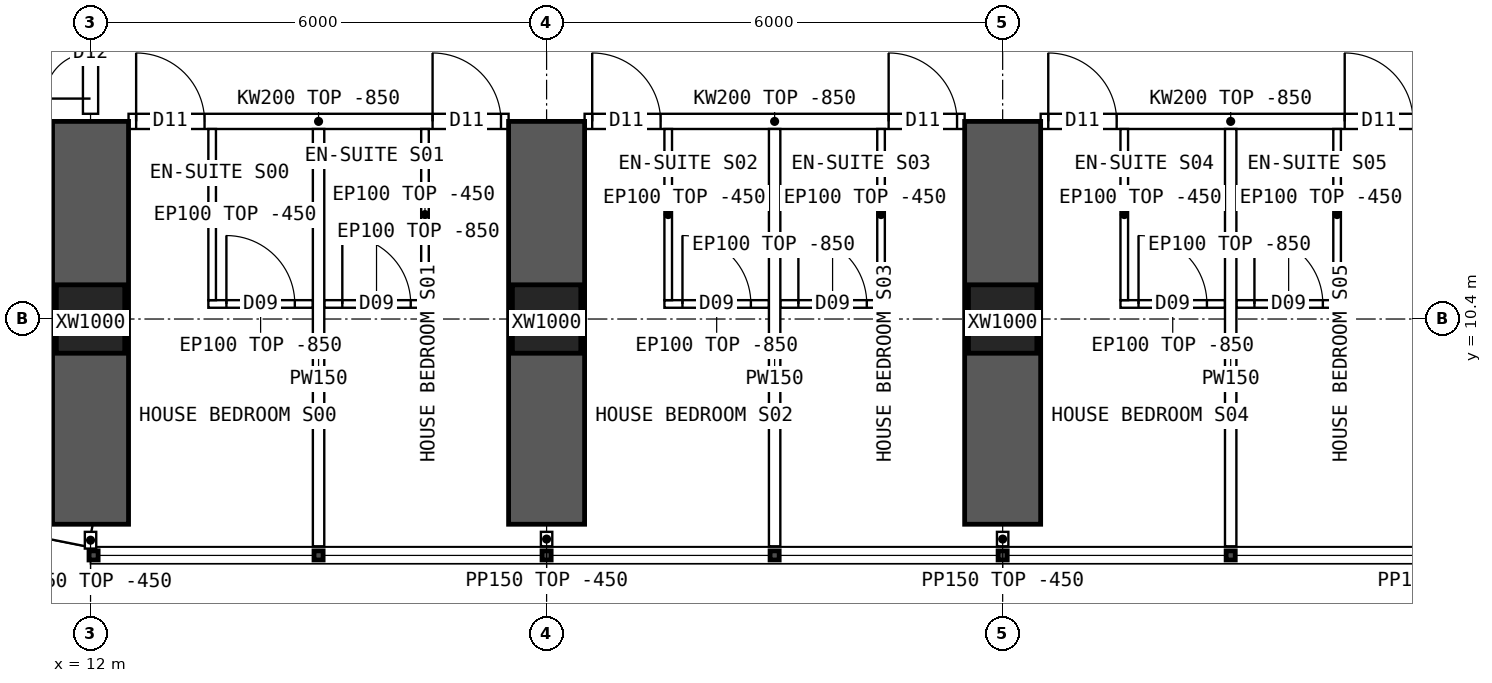
"""IFC4 building model, lengths in metres.
Left out: names, types, materials, properties, quantities, classifications, styles, units other than length and angle.
Written with IfcOpenShell. Run it as: python <this file> out.ifc"""

import sys

from ifc_helpers import new_model, si_unit, direction, frame, frame_2d, origin, origin_2d, place, context, subcontext, project, spatial, polyline, rectangle, hollow_rectangle, outline, extrude, element, fill, save


model = new_model("IFC4")
c1 = context("Model", 3, precision=1e-05, world=origin(), true_north=direction((0.0, 1.0)))
c2 = subcontext(c1, "Body", "Model", "MODEL_VIEW")
j1 = project(units=[si_unit("LENGTHUNIT", "METRE"), si_unit("PLANEANGLEUNIT", "RADIAN")], contexts=[c1])
p1 = place(None, origin())
s1 = spatial("IfcSite", under=j1, at=p1, CompositionType="ELEMENT")
p2 = place(p1, origin())
s2 = spatial("IfcBuilding", under=s1, at=p2, CompositionType="ELEMENT")
p3 = place(p2, frame((0.0, 0.0, 35.2)))
s3 = spatial("IfcBuildingStorey", under=s2, at=p3, CompositionType="ELEMENT", Elevation=35.2)
for number, where, z_axis, x_axis in (
    (1, (12.0, 10.4, 0.0), (0.0, 0.0, 1.0), (1.0, 0.0, 0.0)),
    (2, (18.0, 10.4, 0.0), (0.0, 0.0, 1.0), (1.0, 0.0, 0.0)),
    (3, (24.0, 10.4, 0.0), (0.0, 0.0, 1.0), (1.0, 0.0, 0.0)),
):
    element("IfcColumn", number, at=place(p3, frame(where, z_axis=z_axis, x_axis=x_axis)), inside=s3, PredefinedType="COLUMN", context=c2, shape_type="SweptSolid", body=[
        extrude(hollow_rectangle(XDim=0.9, YDim=0.9, WallThickness=0.09, at=origin_2d()), origin(), (0.0, 0.0, 1.0), 3.75),
    ])
for number, where, z_axis, x_axis in (
    (4, (12.0, 7.7, 0.0), (0.0, 0.0, 1.0), (0.0, 1.0, 0.0)),
    (5, (18.0, 7.7, 0.0), (0.0, 0.0, 1.0), (0.0, 1.0, 0.0)),
    (6, (24.0, 7.7, 0.0), (0.0, 0.0, 1.0), (0.0, 1.0, 0.0)),
):
    element("IfcWall", number, at=place(p3, frame(where, z_axis=z_axis, x_axis=x_axis)), inside=s3, PredefinedType="SHEAR", context=c2, shape_type="SweptSolid", body=[
        extrude(rectangle(XDim=5.3, YDim=1.0, at=frame_2d((2.65, 0.0))), origin(), (0.0, 0.0, 1.0), 3.75),
    ])
p4 = place(p3, frame((8.843, 8.178, 0.0), z_axis=(0.0, 0.0, 1.0), x_axis=(0.980787251524, -0.195080412259, 0.0)))
e7 = element("IfcWall", 7, at=p4, inside=s3, PredefinedType="SOLIDWALL", context=c2, shape_type="SweptSolid", body=[
    extrude(outline(polyline([(-0.03, -0.15), (3.249, -0.15), (3.189, 0.15), (0.03, 0.15), (-0.03, -0.15)])), origin(), (0.0, 0.0, 1.0), 3.3),
])
p5 = place(p4, frame((0.909, 0.0, 0.9)))
e8 = element("IfcOpeningElement", 8, at=p5, cuts=e7, PredefinedType="OPENING", context=c2, shape_type="SweptSolid", body=[
    extrude(rectangle(XDim=1.4, YDim=1.8, at=frame_2d((0.7, 0.9))), frame((0.0, 0.16, 0.0), z_axis=(0.0, -1.0, 0.0), x_axis=(1.0, 0.0, 0.0)), (0.0, 0.0, 1.0), 0.32),
])
p6 = place(p3, frame((12.5, 13.0, 0.0), z_axis=(0.0, 0.0, 1.0), x_axis=(1.0, 0.0, 0.0)))
e9 = element("IfcWall", 9, at=p6, inside=s3, PredefinedType="SOLIDWALL", context=c2, shape_type="SweptSolid", body=[
    extrude(outline(polyline([(0.0, 0.0), (5.0, 0.0), (5.0, 2.9), (0.0, 2.9), (0.0, 0.0)])), frame((0.0, 0.1, 0.0), z_axis=(0.0, -1.0, 0.0), x_axis=(1.0, 0.0, 0.0)), (0.0, 0.0, 1.0), 0.2),
])
p7 = place(p6, frame((0.1, 0.0, 0.0)))
e10 = element("IfcOpeningElement", 10, at=p7, cuts=e9, PredefinedType="OPENING", context=c2, shape_type="SweptSolid", body=[
    extrude(rectangle(XDim=0.9, YDim=2.1, at=frame_2d((0.45, 1.05))), frame((0.0, 0.11, 0.0), z_axis=(0.0, -1.0, 0.0), x_axis=(1.0, 0.0, 0.0)), (0.0, 0.0, 1.0), 0.22),
])
p8 = place(p6, frame((4.0, 0.0, 0.0)))
e11 = element("IfcOpeningElement", 11, at=p8, cuts=e9, PredefinedType="OPENING", context=c2, shape_type="SweptSolid", body=[
    extrude(rectangle(XDim=0.9, YDim=2.1, at=frame_2d((0.45, 1.05))), frame((0.0, 0.11, 0.0), z_axis=(0.0, -1.0, 0.0), x_axis=(1.0, 0.0, 0.0)), (0.0, 0.0, 1.0), 0.22),
])
p9 = place(p3, frame((18.5, 13.0, 0.0), z_axis=(0.0, 0.0, 1.0), x_axis=(1.0, 0.0, 0.0)))
e12 = element("IfcWall", 12, at=p9, inside=s3, PredefinedType="SOLIDWALL", context=c2, shape_type="SweptSolid", body=[
    extrude(outline(polyline([(0.0, 0.0), (5.0, 0.0), (5.0, 2.9), (0.0, 2.9), (0.0, 0.0)])), frame((0.0, 0.1, 0.0), z_axis=(0.0, -1.0, 0.0), x_axis=(1.0, 0.0, 0.0)), (0.0, 0.0, 1.0), 0.2),
])
p10 = place(p9, frame((0.1, 0.0, 0.0)))
e13 = element("IfcOpeningElement", 13, at=p10, cuts=e12, PredefinedType="OPENING", context=c2, shape_type="SweptSolid", body=[
    extrude(rectangle(XDim=0.9, YDim=2.1, at=frame_2d((0.45, 1.05))), frame((0.0, 0.11, 0.0), z_axis=(0.0, -1.0, 0.0), x_axis=(1.0, 0.0, 0.0)), (0.0, 0.0, 1.0), 0.22),
])
p11 = place(p9, frame((4.0, 0.0, 0.0)))
e14 = element("IfcOpeningElement", 14, at=p11, cuts=e12, PredefinedType="OPENING", context=c2, shape_type="SweptSolid", body=[
    extrude(rectangle(XDim=0.9, YDim=2.1, at=frame_2d((0.45, 1.05))), frame((0.0, 0.11, 0.0), z_axis=(0.0, -1.0, 0.0), x_axis=(1.0, 0.0, 0.0)), (0.0, 0.0, 1.0), 0.22),
])
p12 = place(p3, frame((24.5, 13.0, 0.0), z_axis=(0.0, 0.0, 1.0), x_axis=(1.0, 0.0, 0.0)))
e15 = element("IfcWall", 15, at=p12, inside=s3, PredefinedType="SOLIDWALL", context=c2, shape_type="SweptSolid", body=[
    extrude(outline(polyline([(0.0, 0.0), (5.0, 0.0), (5.0, 2.9), (0.0, 2.9), (0.0, 0.0)])), frame((0.0, 0.1, 0.0), z_axis=(0.0, -1.0, 0.0), x_axis=(1.0, 0.0, 0.0)), (0.0, 0.0, 1.0), 0.2),
])
p13 = place(p12, frame((0.1, 0.0, 0.0)))
e16 = element("IfcOpeningElement", 16, at=p13, cuts=e15, PredefinedType="OPENING", context=c2, shape_type="SweptSolid", body=[
    extrude(rectangle(XDim=0.9, YDim=2.1, at=frame_2d((0.45, 1.05))), frame((0.0, 0.11, 0.0), z_axis=(0.0, -1.0, 0.0), x_axis=(1.0, 0.0, 0.0)), (0.0, 0.0, 1.0), 0.22),
])
p14 = place(p12, frame((4.0, 0.0, 0.0)))
e17 = element("IfcOpeningElement", 17, at=p14, cuts=e15, PredefinedType="OPENING", context=c2, shape_type="SweptSolid", body=[
    extrude(rectangle(XDim=0.9, YDim=2.1, at=frame_2d((0.45, 1.05))), frame((0.0, 0.11, 0.0), z_axis=(0.0, -1.0, 0.0), x_axis=(1.0, 0.0, 0.0)), (0.0, 0.0, 1.0), 0.22),
])
p15 = place(p3, frame((15.0, 7.41, 0.0), z_axis=(0.0, 0.0, 1.0), x_axis=(0.0, 1.0, 0.0)))
e18 = element("IfcWall", 18, at=p15, inside=s3, PredefinedType="PARTITIONING", context=c2, shape_type="SweptSolid", body=[
    extrude(outline(polyline([(0.0, 0.0), (5.49, 0.0), (5.49, 2.9), (5.442, 2.9), (5.44, 3.3), (3.192, 3.3), (3.19, 2.9), (2.792, 2.9), (2.79, 3.3), (0.0, 3.3), (0.0, 0.0)])), frame((0.0, 0.075, 0.0), z_axis=(0.0, -1.0, 0.0), x_axis=(1.0, 0.0, 0.0)), (0.0, 0.0, 1.0), 0.15),
])
p16 = place(p3, frame((14.925, 10.598, 0.0), z_axis=(0.0, 0.0, 1.0), x_axis=(-1.0, 0.0, 0.0)))
e19 = element("IfcWall", 19, at=p16, inside=s3, PredefinedType="PARTITIONING", context=c2, shape_type="SweptSolid", body=[
    extrude(outline(polyline([(0.0, 0.0), (1.375, 0.0), (1.375, 2.9), (0.0, 2.9), (0.0, 0.0)])), frame((0.0, 0.05, 0.0), z_axis=(0.0, -1.0, 0.0), x_axis=(1.0, 0.0, 0.0)), (0.0, 0.0, 1.0), 0.1),
])
p17 = place(p16, frame((0.238, 0.0, 0.0)))
e20 = element("IfcOpeningElement", 20, at=p17, cuts=e19, PredefinedType="OPENING", context=c2, shape_type="SweptSolid", body=[
    extrude(rectangle(XDim=0.9, YDim=2.1, at=frame_2d((0.45, 1.05))), frame((0.0, 0.06, 0.0), z_axis=(0.0, -1.0, 0.0), x_axis=(1.0, 0.0, 0.0)), (0.0, 0.0, 1.0), 0.12),
])
p18 = place(p3, frame((13.6, 10.648, 0.0), z_axis=(0.0, 0.0, 1.0), x_axis=(0.0, 1.0, 0.0)))
e21 = element("IfcWall", 21, at=p18, inside=s3, PredefinedType="PARTITIONING", context=c2, shape_type="SweptSolid", body=[
    extrude(outline(polyline([(0.0, 0.0), (2.252, 0.0), (2.252, 2.9), (2.204, 2.9), (2.202, 3.3), (0.0, 3.3), (0.0, 0.0)])), frame((0.0, 0.05, 0.0), z_axis=(0.0, -1.0, 0.0), x_axis=(1.0, 0.0, 0.0)), (0.0, 0.0, 1.0), 0.1),
])
p19 = place(p3, frame((16.45, 10.598, 0.0), z_axis=(0.0, 0.0, 1.0), x_axis=(-1.0, 0.0, 0.0)))
e22 = element("IfcWall", 22, at=p19, inside=s3, PredefinedType="PARTITIONING", context=c2, shape_type="SweptSolid", body=[
    extrude(outline(polyline([(0.0, 0.0), (1.375, 0.0), (1.375, 2.9), (0.0, 2.9), (0.0, 0.0)])), frame((0.0, 0.05, 0.0), z_axis=(0.0, -1.0, 0.0), x_axis=(1.0, 0.0, 0.0)), (0.0, 0.0, 1.0), 0.1),
])
p20 = place(p19, frame((0.238, 0.0, 0.0)))
e23 = element("IfcOpeningElement", 23, at=p20, cuts=e22, PredefinedType="OPENING", context=c2, shape_type="SweptSolid", body=[
    extrude(rectangle(XDim=0.9, YDim=2.1, at=frame_2d((0.45, 1.05))), frame((0.0, 0.06, 0.0), z_axis=(0.0, -1.0, 0.0), x_axis=(1.0, 0.0, 0.0)), (0.0, 0.0, 1.0), 0.12),
])
p21 = place(p3, frame((16.4, 10.648, 0.0), z_axis=(0.0, 0.0, 1.0), x_axis=(0.0, 1.0, 0.0)))
e24 = element("IfcWall", 24, at=p21, inside=s3, PredefinedType="PARTITIONING", context=c2, shape_type="SweptSolid", body=[
    extrude(outline(polyline([(0.0, 0.0), (2.252, 0.0), (2.252, 2.9), (2.204, 2.9), (2.202, 3.3), (0.0, 3.3), (0.0, 0.0)])), frame((0.0, 0.05, 0.0), z_axis=(0.0, -1.0, 0.0), x_axis=(1.0, 0.0, 0.0)), (0.0, 0.0, 1.0), 0.1),
])
p22 = place(p3, frame((21.0, 7.41, 0.0), z_axis=(0.0, 0.0, 1.0), x_axis=(0.0, 1.0, 0.0)))
e25 = element("IfcWall", 25, at=p22, inside=s3, PredefinedType="PARTITIONING", context=c2, shape_type="SweptSolid", body=[
    extrude(outline(polyline([(0.0, 0.0), (5.49, 0.0), (5.49, 2.9), (5.442, 2.9), (5.44, 3.3), (3.192, 3.3), (3.19, 2.9), (2.792, 2.9), (2.79, 3.3), (0.0, 3.3), (0.0, 0.0)])), frame((0.0, 0.075, 0.0), z_axis=(0.0, -1.0, 0.0), x_axis=(1.0, 0.0, 0.0)), (0.0, 0.0, 1.0), 0.15),
])
p23 = place(p3, frame((20.925, 10.598, 0.0), z_axis=(0.0, 0.0, 1.0), x_axis=(-1.0, 0.0, 0.0)))
e26 = element("IfcWall", 26, at=p23, inside=s3, PredefinedType="PARTITIONING", context=c2, shape_type="SweptSolid", body=[
    extrude(outline(polyline([(0.0, 0.0), (1.375, 0.0), (1.375, 2.9), (0.0, 2.9), (0.0, 0.0)])), frame((0.0, 0.05, 0.0), z_axis=(0.0, -1.0, 0.0), x_axis=(1.0, 0.0, 0.0)), (0.0, 0.0, 1.0), 0.1),
])
p24 = place(p23, frame((0.238, 0.0, 0.0)))
e27 = element("IfcOpeningElement", 27, at=p24, cuts=e26, PredefinedType="OPENING", context=c2, shape_type="SweptSolid", body=[
    extrude(rectangle(XDim=0.9, YDim=2.1, at=frame_2d((0.45, 1.05))), frame((0.0, 0.06, 0.0), z_axis=(0.0, -1.0, 0.0), x_axis=(1.0, 0.0, 0.0)), (0.0, 0.0, 1.0), 0.12),
])
p25 = place(p3, frame((19.6, 10.648, 0.0), z_axis=(0.0, 0.0, 1.0), x_axis=(0.0, 1.0, 0.0)))
e28 = element("IfcWall", 28, at=p25, inside=s3, PredefinedType="PARTITIONING", context=c2, shape_type="SweptSolid", body=[
    extrude(outline(polyline([(0.0, 0.0), (2.252, 0.0), (2.252, 2.9), (2.204, 2.9), (2.202, 3.3), (0.0, 3.3), (0.0, 0.0)])), frame((0.0, 0.05, 0.0), z_axis=(0.0, -1.0, 0.0), x_axis=(1.0, 0.0, 0.0)), (0.0, 0.0, 1.0), 0.1),
])
p26 = place(p3, frame((22.45, 10.598, 0.0), z_axis=(0.0, 0.0, 1.0), x_axis=(-1.0, 0.0, 0.0)))
e29 = element("IfcWall", 29, at=p26, inside=s3, PredefinedType="PARTITIONING", context=c2, shape_type="SweptSolid", body=[
    extrude(outline(polyline([(0.0, 0.0), (1.375, 0.0), (1.375, 2.9), (0.0, 2.9), (0.0, 0.0)])), frame((0.0, 0.05, 0.0), z_axis=(0.0, -1.0, 0.0), x_axis=(1.0, 0.0, 0.0)), (0.0, 0.0, 1.0), 0.1),
])
p27 = place(p26, frame((0.238, 0.0, 0.0)))
e30 = element("IfcOpeningElement", 30, at=p27, cuts=e29, PredefinedType="OPENING", context=c2, shape_type="SweptSolid", body=[
    extrude(rectangle(XDim=0.9, YDim=2.1, at=frame_2d((0.45, 1.05))), frame((0.0, 0.06, 0.0), z_axis=(0.0, -1.0, 0.0), x_axis=(1.0, 0.0, 0.0)), (0.0, 0.0, 1.0), 0.12),
])
p28 = place(p3, frame((22.4, 10.648, 0.0), z_axis=(0.0, 0.0, 1.0), x_axis=(0.0, 1.0, 0.0)))
e31 = element("IfcWall", 31, at=p28, inside=s3, PredefinedType="PARTITIONING", context=c2, shape_type="SweptSolid", body=[
    extrude(outline(polyline([(0.0, 0.0), (2.252, 0.0), (2.252, 2.9), (2.204, 2.9), (2.202, 3.3), (0.0, 3.3), (0.0, 0.0)])), frame((0.0, 0.05, 0.0), z_axis=(0.0, -1.0, 0.0), x_axis=(1.0, 0.0, 0.0)), (0.0, 0.0, 1.0), 0.1),
])
p29 = place(p3, frame((27.0, 7.41, 0.0), z_axis=(0.0, 0.0, 1.0), x_axis=(0.0, 1.0, 0.0)))
e32 = element("IfcWall", 32, at=p29, inside=s3, PredefinedType="PARTITIONING", context=c2, shape_type="SweptSolid", body=[
    extrude(outline(polyline([(0.0, 0.0), (5.49, 0.0), (5.49, 2.9), (5.442, 2.9), (5.44, 3.3), (3.192, 3.3), (3.19, 2.9), (2.792, 2.9), (2.79, 3.3), (0.0, 3.3), (0.0, 0.0)])), frame((0.0, 0.075, 0.0), z_axis=(0.0, -1.0, 0.0), x_axis=(1.0, 0.0, 0.0)), (0.0, 0.0, 1.0), 0.15),
])
p30 = place(p3, frame((26.925, 10.598, 0.0), z_axis=(0.0, 0.0, 1.0), x_axis=(-1.0, 0.0, 0.0)))
e33 = element("IfcWall", 33, at=p30, inside=s3, PredefinedType="PARTITIONING", context=c2, shape_type="SweptSolid", body=[
    extrude(outline(polyline([(0.0, 0.0), (1.375, 0.0), (1.375, 2.9), (0.0, 2.9), (0.0, 0.0)])), frame((0.0, 0.05, 0.0), z_axis=(0.0, -1.0, 0.0), x_axis=(1.0, 0.0, 0.0)), (0.0, 0.0, 1.0), 0.1),
])
p31 = place(p30, frame((0.238, 0.0, 0.0)))
e34 = element("IfcOpeningElement", 34, at=p31, cuts=e33, PredefinedType="OPENING", context=c2, shape_type="SweptSolid", body=[
    extrude(rectangle(XDim=0.9, YDim=2.1, at=frame_2d((0.45, 1.05))), frame((0.0, 0.06, 0.0), z_axis=(0.0, -1.0, 0.0), x_axis=(1.0, 0.0, 0.0)), (0.0, 0.0, 1.0), 0.12),
])
p32 = place(p3, frame((25.6, 10.648, 0.0), z_axis=(0.0, 0.0, 1.0), x_axis=(0.0, 1.0, 0.0)))
e35 = element("IfcWall", 35, at=p32, inside=s3, PredefinedType="PARTITIONING", context=c2, shape_type="SweptSolid", body=[
    extrude(outline(polyline([(0.0, 0.0), (2.252, 0.0), (2.252, 2.9), (2.204, 2.9), (2.202, 3.3), (0.0, 3.3), (0.0, 0.0)])), frame((0.0, 0.05, 0.0), z_axis=(0.0, -1.0, 0.0), x_axis=(1.0, 0.0, 0.0)), (0.0, 0.0, 1.0), 0.1),
])
p33 = place(p3, frame((28.45, 10.598, 0.0), z_axis=(0.0, 0.0, 1.0), x_axis=(-1.0, 0.0, 0.0)))
e36 = element("IfcWall", 36, at=p33, inside=s3, PredefinedType="PARTITIONING", context=c2, shape_type="SweptSolid", body=[
    extrude(outline(polyline([(0.0, 0.0), (1.375, 0.0), (1.375, 2.9), (0.0, 2.9), (0.0, 0.0)])), frame((0.0, 0.05, 0.0), z_axis=(0.0, -1.0, 0.0), x_axis=(1.0, 0.0, 0.0)), (0.0, 0.0, 1.0), 0.1),
])
p34 = place(p33, frame((0.238, 0.0, 0.0)))
e37 = element("IfcOpeningElement", 37, at=p34, cuts=e36, PredefinedType="OPENING", context=c2, shape_type="SweptSolid", body=[
    extrude(rectangle(XDim=0.9, YDim=2.1, at=frame_2d((0.45, 1.05))), frame((0.0, 0.06, 0.0), z_axis=(0.0, -1.0, 0.0), x_axis=(1.0, 0.0, 0.0)), (0.0, 0.0, 1.0), 0.12),
])
p35 = place(p3, frame((28.4, 10.648, 0.0), z_axis=(0.0, 0.0, 1.0), x_axis=(0.0, 1.0, 0.0)))
e38 = element("IfcWall", 38, at=p35, inside=s3, PredefinedType="PARTITIONING", context=c2, shape_type="SweptSolid", body=[
    extrude(outline(polyline([(0.0, 0.0), (2.252, 0.0), (2.252, 2.9), (2.204, 2.9), (2.202, 3.3), (0.0, 3.3), (0.0, 0.0)])), frame((0.0, 0.05, 0.0), z_axis=(0.0, -1.0, 0.0), x_axis=(1.0, 0.0, 0.0)), (0.0, 0.0, 1.0), 0.1),
])
p36 = place(p3, frame((12.0, 13.1, 0.0), z_axis=(0.0, 0.0, 1.0), x_axis=(0.0, 1.0, 0.0)))
e39 = element("IfcWall", 39, at=p36, inside=s3, PredefinedType="SOLIDWALL", context=c2, shape_type="SweptSolid", body=[
    extrude(outline(polyline([(0.0, 0.0), (1.6, 0.0), (1.6, 2.85), (0.0, 2.85), (0.0, 0.0)])), frame((0.0, 0.1, 0.0), z_axis=(0.0, -1.0, 0.0), x_axis=(1.0, 0.0, 0.0)), (0.0, 0.0, 1.0), 0.2),
])
p37 = place(p36, frame((0.2, 0.0, 0.0)))
e40 = element("IfcOpeningElement", 40, at=p37, cuts=e39, PredefinedType="OPENING", context=c2, shape_type="SweptSolid", body=[
    extrude(rectangle(XDim=1.2, YDim=2.1, at=frame_2d((0.6, 1.05))), frame((0.0, 0.11, 0.0), z_axis=(0.0, -1.0, 0.0), x_axis=(1.0, 0.0, 0.0)), (0.0, 0.0, 1.0), 0.22),
])
p38 = place(p3, frame((12.0, 7.6, 0.0), z_axis=(0.0, 0.0, 1.0), x_axis=(0.0, -1.0, 0.0)))
e41 = element("IfcWall", 41, at=p38, inside=s3, PredefinedType="PARTITIONING", context=c2, shape_type="SweptSolid", body=[
    extrude(rectangle(XDim=0.22, YDim=0.15, at=frame_2d((0.11, 0.0))), origin(), (0.0, 0.0, 1.0), 3.3),
])
for number, where, z_axis, x_axis in (
    (42, (18.0, 7.6, 0.0), (0.0, 0.0, 1.0), (0.0, -1.0, 0.0)),
    (43, (24.0, 7.6, 0.0), (0.0, 0.0, 1.0), (0.0, -1.0, 0.0)),
):
    element("IfcWall", number, at=place(p3, frame(where, z_axis=z_axis, x_axis=x_axis)), inside=s3, PredefinedType="PARTITIONING", context=c2, shape_type="SweptSolid", body=[
        extrude(rectangle(XDim=0.19, YDim=0.15, at=frame_2d((0.095, 0.0))), origin(), (0.0, 0.0, 1.0), 3.3),
    ])
p39 = place(p17, origin())
e44 = element("IfcDoor", 44, at=p39, inside=s3, OperationType="SINGLE_SWING_RIGHT", PredefinedType="DOOR", context=c2, shape_type="SweptSolid", body=[
    extrude(rectangle(XDim=0.9, YDim=2.1, at=frame_2d((0.45, 1.05))), frame((0.0, 0.025, 0.0), z_axis=(0.0, -1.0, 0.0), x_axis=(1.0, 0.0, 0.0)), (0.0, 0.0, 1.0), 0.05),
])
fill(e20, e44)
p40 = place(p7, origin())
e45 = element("IfcDoor", 45, at=p40, inside=s3, OperationType="SINGLE_SWING_LEFT", PredefinedType="DOOR", context=c2, shape_type="SweptSolid", body=[
    extrude(rectangle(XDim=0.9, YDim=2.1, at=frame_2d((0.45, 1.05))), frame((0.0, 0.025, 0.0), z_axis=(0.0, -1.0, 0.0), x_axis=(1.0, 0.0, 0.0)), (0.0, 0.0, 1.0), 0.05),
])
fill(e10, e45)
p41 = place(p20, origin())
e46 = element("IfcDoor", 46, at=p41, inside=s3, OperationType="SINGLE_SWING_RIGHT", PredefinedType="DOOR", context=c2, shape_type="SweptSolid", body=[
    extrude(rectangle(XDim=0.9, YDim=2.1, at=frame_2d((0.45, 1.05))), frame((0.0, 0.025, 0.0), z_axis=(0.0, -1.0, 0.0), x_axis=(1.0, 0.0, 0.0)), (0.0, 0.0, 1.0), 0.05),
])
fill(e23, e46)
p42 = place(p8, origin())
e47 = element("IfcDoor", 47, at=p42, inside=s3, OperationType="SINGLE_SWING_LEFT", PredefinedType="DOOR", context=c2, shape_type="SweptSolid", body=[
    extrude(rectangle(XDim=0.9, YDim=2.1, at=frame_2d((0.45, 1.05))), frame((0.0, 0.025, 0.0), z_axis=(0.0, -1.0, 0.0), x_axis=(1.0, 0.0, 0.0)), (0.0, 0.0, 1.0), 0.05),
])
fill(e11, e47)
p43 = place(p24, origin())
e48 = element("IfcDoor", 48, at=p43, inside=s3, OperationType="SINGLE_SWING_RIGHT", PredefinedType="DOOR", context=c2, shape_type="SweptSolid", body=[
    extrude(rectangle(XDim=0.9, YDim=2.1, at=frame_2d((0.45, 1.05))), frame((0.0, 0.025, 0.0), z_axis=(0.0, -1.0, 0.0), x_axis=(1.0, 0.0, 0.0)), (0.0, 0.0, 1.0), 0.05),
])
fill(e27, e48)
p44 = place(p10, origin())
e49 = element("IfcDoor", 49, at=p44, inside=s3, OperationType="SINGLE_SWING_LEFT", PredefinedType="DOOR", context=c2, shape_type="SweptSolid", body=[
    extrude(rectangle(XDim=0.9, YDim=2.1, at=frame_2d((0.45, 1.05))), frame((0.0, 0.025, 0.0), z_axis=(0.0, -1.0, 0.0), x_axis=(1.0, 0.0, 0.0)), (0.0, 0.0, 1.0), 0.05),
])
fill(e13, e49)
p45 = place(p27, origin())
e50 = element("IfcDoor", 50, at=p45, inside=s3, OperationType="SINGLE_SWING_RIGHT", PredefinedType="DOOR", context=c2, shape_type="SweptSolid", body=[
    extrude(rectangle(XDim=0.9, YDim=2.1, at=frame_2d((0.45, 1.05))), frame((0.0, 0.025, 0.0), z_axis=(0.0, -1.0, 0.0), x_axis=(1.0, 0.0, 0.0)), (0.0, 0.0, 1.0), 0.05),
])
fill(e30, e50)
p46 = place(p11, origin())
e51 = element("IfcDoor", 51, at=p46, inside=s3, OperationType="SINGLE_SWING_LEFT", PredefinedType="DOOR", context=c2, shape_type="SweptSolid", body=[
    extrude(rectangle(XDim=0.9, YDim=2.1, at=frame_2d((0.45, 1.05))), frame((0.0, 0.025, 0.0), z_axis=(0.0, -1.0, 0.0), x_axis=(1.0, 0.0, 0.0)), (0.0, 0.0, 1.0), 0.05),
])
fill(e14, e51)
p47 = place(p31, origin())
e52 = element("IfcDoor", 52, at=p47, inside=s3, OperationType="SINGLE_SWING_RIGHT", PredefinedType="DOOR", context=c2, shape_type="SweptSolid", body=[
    extrude(rectangle(XDim=0.9, YDim=2.1, at=frame_2d((0.45, 1.05))), frame((0.0, 0.025, 0.0), z_axis=(0.0, -1.0, 0.0), x_axis=(1.0, 0.0, 0.0)), (0.0, 0.0, 1.0), 0.05),
])
fill(e34, e52)
p48 = place(p13, origin())
e53 = element("IfcDoor", 53, at=p48, inside=s3, OperationType="SINGLE_SWING_LEFT", PredefinedType="DOOR", context=c2, shape_type="SweptSolid", body=[
    extrude(rectangle(XDim=0.9, YDim=2.1, at=frame_2d((0.45, 1.05))), frame((0.0, 0.025, 0.0), z_axis=(0.0, -1.0, 0.0), x_axis=(1.0, 0.0, 0.0)), (0.0, 0.0, 1.0), 0.05),
])
fill(e16, e53)
p49 = place(p34, origin())
e54 = element("IfcDoor", 54, at=p49, inside=s3, OperationType="SINGLE_SWING_RIGHT", PredefinedType="DOOR", context=c2, shape_type="SweptSolid", body=[
    extrude(rectangle(XDim=0.9, YDim=2.1, at=frame_2d((0.45, 1.05))), frame((0.0, 0.025, 0.0), z_axis=(0.0, -1.0, 0.0), x_axis=(1.0, 0.0, 0.0)), (0.0, 0.0, 1.0), 0.05),
])
fill(e37, e54)
p50 = place(p14, origin())
e55 = element("IfcDoor", 55, at=p50, inside=s3, OperationType="SINGLE_SWING_LEFT", PredefinedType="DOOR", context=c2, shape_type="SweptSolid", body=[
    extrude(rectangle(XDim=0.9, YDim=2.1, at=frame_2d((0.45, 1.05))), frame((0.0, 0.025, 0.0), z_axis=(0.0, -1.0, 0.0), x_axis=(1.0, 0.0, 0.0)), (0.0, 0.0, 1.0), 0.05),
])
fill(e17, e55)
p51 = place(p37, origin())
e56 = element("IfcDoor", 56, at=p51, inside=s3, OperationType="DOUBLE_DOOR_SINGLE_SWING", PredefinedType="DOOR", context=c2, shape_type="SweptSolid", body=[
    extrude(rectangle(XDim=1.2, YDim=2.1, at=frame_2d((0.6, 1.05))), frame((0.0, 0.025, 0.0), z_axis=(0.0, -1.0, 0.0), x_axis=(1.0, 0.0, 0.0)), (0.0, 0.0, 1.0), 0.05),
])
fill(e40, e56)
save(model, sys.argv[1])
